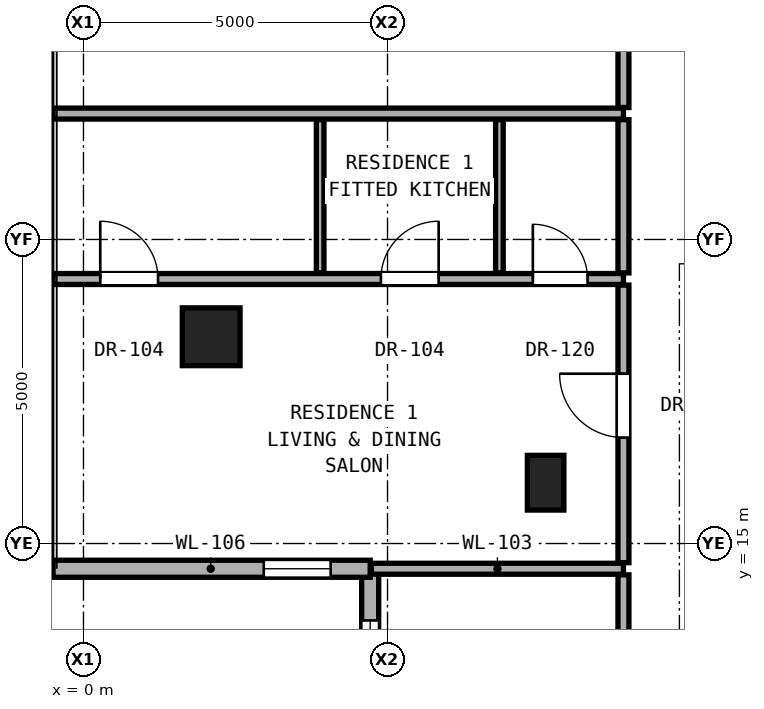
"""IFC4 building model, lengths in metres.
Left out: names, types, materials, properties, quantities, classifications, styles, units other than length and angle.
Written with IfcOpenShell. Run it as: python <this file> out.ifc"""

import sys

from ifc_helpers import new_model, si_unit, direction, frame, frame_2d, origin, origin_2d, place, context, subcontext, project, spatial, rectangle, hollow_rectangle, extrude, element, fill, save


model = new_model("IFC4")
c1 = context("Model", 3, precision=1e-05, world=origin(), true_north=direction((0.0, 1.0)))
c2 = subcontext(c1, "Body", "Model", "MODEL_VIEW")
j1 = project(units=[si_unit("LENGTHUNIT", "METRE"), si_unit("PLANEANGLEUNIT", "RADIAN")], contexts=[c1])
p1 = place(None, origin())
s1 = spatial("IfcSite", under=j1, at=p1, CompositionType="ELEMENT")
p2 = place(p1, origin())
s2 = spatial("IfcBuilding", under=s1, at=p2, CompositionType="ELEMENT")
p3 = place(p2, frame((0.0, 0.0, 170.65)))
s3 = spatial("IfcBuildingStorey", under=s2, at=p3, CompositionType="ELEMENT", Elevation=170.65)
p4 = place(p3, frame((2.1, 18.4, 0.0), z_axis=(0.0, 0.0, 1.0), x_axis=(1.0, 0.0, 0.0)))
e1 = element("IfcColumn", 1, at=p4, inside=s3, PredefinedType="COLUMN", context=c2, shape_type="SweptSolid", body=[
    extrude(hollow_rectangle(XDim=0.95, YDim=0.95, WallThickness=0.05, at=origin_2d()), origin(), (0.0, 0.0, 1.0), 3.25),
])
p5 = place(p3, frame((7.6, 16.0, 0.0), z_axis=(0.0, 0.0, 1.0), x_axis=(1.0, 0.0, 0.0)))
e2 = element("IfcColumn", 2, at=p5, inside=s3, PredefinedType="PILASTER", context=c2, shape_type="SweptSolid", body=[
    extrude(rectangle(XDim=0.6, YDim=0.9, at=origin_2d()), origin(), (0.0, 0.0, 1.0), 3.25),
])
p6 = place(p3, frame((4.715, 14.585, 0.0), z_axis=(0.0, 0.0, 1.0), x_axis=(0.0, -1.0, 0.0)))
e3 = element("IfcWall", 3, at=p6, inside=s3, PredefinedType="SOLIDWALL", context=c2, shape_type="SweptSolid", body=[
    extrude(rectangle(XDim=5.245, YDim=0.28, at=frame_2d((2.623, 0.0))), origin(), (0.0, 0.0, 1.0), 3.03),
])
p7 = place(p6, frame((0.85, 0.0, 0.68)))
e4 = element("IfcOpeningElement", 4, at=p7, cuts=e3, PredefinedType="OPENING", context=c2, shape_type="SweptSolid", body=[
    extrude(rectangle(XDim=2.1, YDim=2.2, at=frame_2d((1.05, 1.1))), frame((0.0, 0.15, 0.0), z_axis=(0.0, -1.0, 0.0), x_axis=(1.0, 0.0, 0.0)), (0.0, 0.0, 1.0), 0.3),
])
p8 = place(p3, frame((-0.53, 14.585, 0.0), z_axis=(0.0, 0.0, 1.0), x_axis=(1.0, 0.0, 0.0)))
e5 = element("IfcWall", 5, at=p8, inside=s3, PredefinedType="SOLIDWALL", context=c2, shape_type="SweptSolid", body=[
    extrude(rectangle(XDim=5.245, YDim=0.28, at=frame_2d((2.623, 0.0))), origin(), (0.0, 0.0, 1.0), 3.03),
])
p9 = place(p8, frame((3.495, 0.0, 0.85)))
e6 = element("IfcOpeningElement", 6, at=p9, cuts=e5, PredefinedType="OPENING", context=c2, shape_type="SweptSolid", body=[
    extrude(rectangle(XDim=1.1, YDim=2.0, at=frame_2d((0.55, 1.0))), frame((0.0, 0.15, 0.0), z_axis=(0.0, -1.0, 0.0), x_axis=(1.0, 0.0, 0.0)), (0.0, 0.0, 1.0), 0.3),
])
p10 = place(p3, frame((4.735, 14.585, 0.0), z_axis=(0.0, 0.0, 1.0), x_axis=(1.0, 0.0, 0.0)))
e7 = element("IfcWall", 7, at=p10, inside=s3, PredefinedType="PARTITIONING", context=c2, shape_type="SweptSolid", body=[
    extrude(rectangle(XDim=4.145, YDim=0.18, at=frame_2d((2.072, 0.0))), origin(), (0.0, 0.0, 1.0), 3.05),
])
p11 = place(p3, frame((-0.53, 19.35, 0.0), z_axis=(0.0, 0.0, 1.0), x_axis=(1.0, 0.0, 0.0)))
e8 = element("IfcWall", 8, at=p11, inside=s3, PredefinedType="PARTITIONING", context=c2, shape_type="SweptSolid", body=[
    extrude(rectangle(XDim=9.41, YDim=0.18, at=frame_2d((4.705, 0.0))), origin(), (0.0, 0.0, 1.0), 2.269),
])
p12 = place(p11, frame((0.806, 0.0, 0.0)))
e9 = element("IfcOpeningElement", 9, at=p12, cuts=e8, PredefinedType="OPENING", context=c2, shape_type="SweptSolid", body=[
    extrude(rectangle(XDim=0.95, YDim=2.15, at=frame_2d((0.475, 1.075))), frame((0.0, 0.1, 0.0), z_axis=(0.0, -1.0, 0.0), x_axis=(1.0, 0.0, 0.0)), (0.0, 0.0, 1.0), 0.2),
])
p13 = place(p11, frame((5.421, 0.0, 0.0)))
e10 = element("IfcOpeningElement", 10, at=p13, cuts=e8, PredefinedType="OPENING", context=c2, shape_type="SweptSolid", body=[
    extrude(rectangle(XDim=0.95, YDim=2.15, at=frame_2d((0.475, 1.075))), frame((0.0, 0.1, 0.0), z_axis=(0.0, -1.0, 0.0), x_axis=(1.0, 0.0, 0.0)), (0.0, 0.0, 1.0), 0.2),
])
p14 = place(p11, frame((7.92, 0.0, 0.0)))
e11 = element("IfcOpeningElement", 11, at=p14, cuts=e8, PredefinedType="OPENING", context=c2, shape_type="SweptSolid", body=[
    extrude(rectangle(XDim=0.9, YDim=2.1, at=frame_2d((0.45, 1.05))), frame((0.0, 0.1, 0.0), z_axis=(0.0, -1.0, 0.0), x_axis=(1.0, 0.0, 0.0)), (0.0, 0.0, 1.0), 0.2),
])
p15 = place(p3, frame((-0.53, 22.07, 0.0), z_axis=(0.0, 0.0, 1.0), x_axis=(1.0, 0.0, 0.0)))
e12 = element("IfcWall", 12, at=p15, inside=s3, PredefinedType="PARTITIONING", context=c2, shape_type="SweptSolid", body=[
    extrude(rectangle(XDim=9.41, YDim=0.18, at=frame_2d((4.705, 0.0))), origin(), (0.0, 0.0, 1.0), 2.269),
])
for number, where, z_axis, x_axis in (
    (13, (3.892, 19.45, 0.0), (0.0, 0.0, 1.0), (0.0, 1.0, 0.0)),
    (14, (6.84, 19.45, 0.0), (0.0, 0.0, 1.0), (0.0, 1.0, 0.0)),
):
    element("IfcWall", number, at=place(p3, frame(where, z_axis=z_axis, x_axis=x_axis)), inside=s3, PredefinedType="PARTITIONING", context=c2, shape_type="SweptSolid", body=[
        extrude(rectangle(XDim=2.52, YDim=0.125, at=frame_2d((1.26, 0.0))), origin(), (0.0, 0.0, 1.0), 3.05),
    ])
p16 = place(p3, frame((8.88, 9.34, 0.0), z_axis=(0.0, 0.0, 1.0), x_axis=(0.0, 1.0, 0.0)))
e15 = element("IfcWall", 15, at=p16, inside=s3, PredefinedType="PARTITIONING", context=c2, shape_type="SweptSolid", body=[
    extrude(rectangle(XDim=5.145, YDim=0.18, at=frame_2d((2.573, 0.0))), origin(), (0.0, 0.0, 1.0), 3.05),
])
p17 = place(p16, frame((2.097, 0.0, 0.0)))
e16 = element("IfcOpeningElement", 16, at=p17, cuts=e15, PredefinedType="OPENING", context=c2, shape_type="SweptSolid", body=[
    extrude(rectangle(XDim=0.95, YDim=2.15, at=frame_2d((0.475, 1.075))), frame((0.0, 0.1, 0.0), z_axis=(0.0, -1.0, 0.0), x_axis=(1.0, 0.0, 0.0)), (0.0, 0.0, 1.0), 0.2),
])
p18 = place(p3, frame((8.88, 14.685, 0.0), z_axis=(0.0, 0.0, 1.0), x_axis=(0.0, 1.0, 0.0)))
e17 = element("IfcWall", 17, at=p18, inside=s3, PredefinedType="PARTITIONING", context=c2, shape_type="SweptSolid", body=[
    extrude(rectangle(XDim=4.565, YDim=0.18, at=frame_2d((2.282, 0.0))), origin(), (0.0, 0.0, 1.0), 2.442),
])
p19 = place(p18, frame((2.058, 0.0, 0.0)))
e18 = element("IfcOpeningElement", 18, at=p19, cuts=e17, PredefinedType="OPENING", context=c2, shape_type="SweptSolid", body=[
    extrude(rectangle(XDim=1.05, YDim=2.2, at=frame_2d((0.525, 1.1))), frame((0.0, 0.1, 0.0), z_axis=(0.0, -1.0, 0.0), x_axis=(1.0, 0.0, 0.0)), (0.0, 0.0, 1.0), 0.2),
])
p20 = place(p3, frame((8.88, 19.45, 0.0), z_axis=(0.0, 0.0, 1.0), x_axis=(0.0, 1.0, 0.0)))
e19 = element("IfcWall", 19, at=p20, inside=s3, PredefinedType="PARTITIONING", context=c2, shape_type="SweptSolid", body=[
    extrude(rectangle(XDim=2.52, YDim=0.18, at=frame_2d((1.26, 0.0))), origin(), (0.0, 0.0, 1.0), 3.05),
])
p21 = place(p3, frame((8.88, 22.17, 0.0), z_axis=(0.0, 0.0, 1.0), x_axis=(0.0, 1.0, 0.0)))
e20 = element("IfcWall", 20, at=p21, inside=s3, PredefinedType="PARTITIONING", context=c2, shape_type="SweptSolid", body=[
    extrude(rectangle(XDim=3.027, YDim=0.18, at=frame_2d((1.514, 0.0))), origin(), (0.0, 0.0, 1.0), 2.346),
])
p22 = place(p21, frame((0.989, 0.0, 0.0)))
e21 = element("IfcOpeningElement", 21, at=p22, cuts=e20, PredefinedType="OPENING", context=c2, shape_type="SweptSolid", body=[
    extrude(rectangle(XDim=1.05, YDim=2.2, at=frame_2d((0.525, 1.1))), frame((0.0, 0.1, 0.0), z_axis=(0.0, -1.0, 0.0), x_axis=(1.0, 0.0, 0.0)), (0.0, 0.0, 1.0), 0.2),
])
p23 = place(p7, origin())
e22 = element("IfcWindow", 22, at=p23, inside=s3, PartitioningType="SINGLE_PANEL", PredefinedType="WINDOW", context=c2, shape_type="SweptSolid", body=[
    extrude(rectangle(XDim=2.1, YDim=2.2, at=frame_2d((1.05, 1.1))), frame((0.0, 0.03, 0.0), z_axis=(0.0, -1.0, 0.0), x_axis=(1.0, 0.0, 0.0)), (0.0, 0.0, 1.0), 0.06),
])
fill(e4, e22)
p24 = place(p9, origin())
e23 = element("IfcWindow", 23, at=p24, inside=s3, PartitioningType="SINGLE_PANEL", PredefinedType="WINDOW", context=c2, shape_type="SweptSolid", body=[
    extrude(rectangle(XDim=1.1, YDim=2.0, at=frame_2d((0.55, 1.0))), frame((0.0, 0.03, 0.0), z_axis=(0.0, -1.0, 0.0), x_axis=(1.0, 0.0, 0.0)), (0.0, 0.0, 1.0), 0.06),
])
fill(e6, e23)
p25 = place(p19, origin())
e24 = element("IfcDoor", 24, at=p25, inside=s3, OperationType="SINGLE_SWING_RIGHT", PredefinedType="DOOR", context=c2, shape_type="SweptSolid", body=[
    extrude(rectangle(XDim=1.05, YDim=2.2, at=frame_2d((0.525, 1.1))), frame((0.0, 0.025, 0.0), z_axis=(0.0, -1.0, 0.0), x_axis=(1.0, 0.0, 0.0)), (0.0, 0.0, 1.0), 0.05),
])
fill(e18, e24)
p26 = place(p12, origin())
e25 = element("IfcDoor", 25, at=p26, inside=s3, OperationType="SINGLE_SWING_LEFT", PredefinedType="DOOR", context=c2, shape_type="SweptSolid", body=[
    extrude(rectangle(XDim=0.95, YDim=2.15, at=frame_2d((0.475, 1.075))), frame((0.0, 0.025, 0.0), z_axis=(0.0, -1.0, 0.0), x_axis=(1.0, 0.0, 0.0)), (0.0, 0.0, 1.0), 0.05),
])
fill(e9, e25)
p27 = place(p13, origin())
e26 = element("IfcDoor", 26, at=p27, inside=s3, OperationType="SINGLE_SWING_RIGHT", PredefinedType="DOOR", context=c2, shape_type="SweptSolid", body=[
    extrude(rectangle(XDim=0.95, YDim=2.15, at=frame_2d((0.475, 1.075))), frame((0.0, 0.025, 0.0), z_axis=(0.0, -1.0, 0.0), x_axis=(1.0, 0.0, 0.0)), (0.0, 0.0, 1.0), 0.05),
])
fill(e10, e26)
p28 = place(p14, origin())
e27 = element("IfcDoor", 27, at=p28, inside=s3, OperationType="SINGLE_SWING_LEFT", PredefinedType="DOOR", context=c2, shape_type="SweptSolid", body=[
    extrude(rectangle(XDim=0.9, YDim=2.1, at=frame_2d((0.45, 1.05))), frame((0.0, 0.025, 0.0), z_axis=(0.0, -1.0, 0.0), x_axis=(1.0, 0.0, 0.0)), (0.0, 0.0, 1.0), 0.05),
])
fill(e11, e27)
save(model, sys.argv[1])
